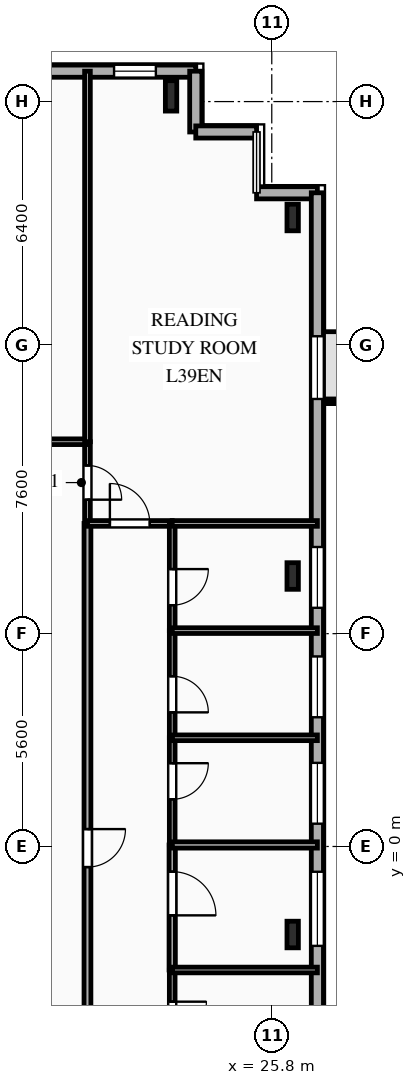
"""IFC4 building model, lengths in metres.
Left out: names, types, materials, properties, quantities, classifications, styles, units other than length and angle.
Written with IfcOpenShell. Run it as: python <this file> out.ifc"""

import sys

from ifc_helpers import new_model, si_unit, direction, frame, frame_2d, origin, origin_2d, place, context, subcontext, project, spatial, rectangle, i_section, extrude, element, fill, save


model = new_model("IFC4")
c1 = context("Model", 3, precision=1e-05, world=origin(), true_north=direction((0.0, 1.0)))
c2 = subcontext(c1, "Body", "Model", "MODEL_VIEW")
j1 = project(units=[si_unit("LENGTHUNIT", "METRE"), si_unit("PLANEANGLEUNIT", "RADIAN")], contexts=[c1])
p1 = place(None, origin())
s1 = spatial("IfcSite", under=j1, at=p1, CompositionType="ELEMENT")
p2 = place(p1, origin())
s2 = spatial("IfcBuilding", under=s1, at=p2, CompositionType="ELEMENT")
p3 = place(p2, frame((0.0, 0.0, 141.05)))
s3 = spatial("IfcBuildingStorey", under=s2, at=p3, CompositionType="ELEMENT", Elevation=141.05)
p4 = place(p3, frame((23.15, 19.75, 0.0), z_axis=(0.0, 0.0, 1.0), x_axis=(1.0, 0.0, 0.0)))
e1 = element("IfcColumn", 1, at=p4, inside=s3, PredefinedType="COLUMN", context=c2, shape_type="SweptSolid", body=[
    extrude(i_section(OverallWidth=0.3, OverallDepth=0.8, WebThickness=0.018, FlangeThickness=0.033, FilletRadius=0.03, at=origin_2d()), origin(), (0.0, 0.0, 1.0), 3.35),
])
for number, where, z_axis, x_axis in (
    (2, (26.35, -2.317, 0.0), (0.0, 0.0, 1.0), (1.0, 0.0, 0.0)),
    (3, (26.35, 7.117, 0.0), (0.0, 0.0, 1.0), (1.0, 0.0, 0.0)),
    (4, (26.35, 16.55, 0.0), (0.0, 0.0, 1.0), (1.0, 0.0, 0.0)),
):
    element("IfcColumn", number, at=place(p3, frame(where, z_axis=z_axis, x_axis=x_axis)), inside=s3, PredefinedType="COLUMN", context=c2, shape_type="SweptSolid", body=[
        extrude(i_section(OverallWidth=0.3, OverallDepth=0.7, WebThickness=0.017, FlangeThickness=0.032, FilletRadius=0.027, at=origin_2d()), origin(), (0.0, 0.0, 1.0), 3.35),
    ])
p5 = place(p3, frame((-25.8, 20.4, 0.0), z_axis=(0.0, 0.0, 1.0), x_axis=(1.0, 0.0, 0.0)))
e5 = element("IfcWall", 5, at=p5, inside=s3, PredefinedType="SOLIDWALL", context=c2, shape_type="SweptSolid", body=[
    extrude(rectangle(XDim=49.6, YDim=0.32, at=frame_2d((24.8, 0.0))), origin(), (0.0, 0.0, 1.0), 3.04),
])
p6 = place(p5, frame((2.135, 0.0, 0.85)))
e6 = element("IfcOpeningElement", 6, at=p6, cuts=e5, PredefinedType="OPENING", context=c2, shape_type="SweptSolid", body=[
    extrude(rectangle(XDim=1.65, YDim=1.85, at=frame_2d((0.825, 0.925))), frame((0.0, 0.17, 0.0), z_axis=(0.0, -1.0, 0.0), x_axis=(1.0, 0.0, 0.0)), (0.0, 0.0, 1.0), 0.34),
])
p7 = place(p5, frame((6.706, 0.0, 0.85)))
e7 = element("IfcOpeningElement", 7, at=p7, cuts=e5, PredefinedType="OPENING", context=c2, shape_type="SweptSolid", body=[
    extrude(rectangle(XDim=1.65, YDim=1.85, at=frame_2d((0.825, 0.925))), frame((0.0, 0.17, 0.0), z_axis=(0.0, -1.0, 0.0), x_axis=(1.0, 0.0, 0.0)), (0.0, 0.0, 1.0), 0.34),
])
p8 = place(p5, frame((14.76, 0.0, 0.85)))
e8 = element("IfcOpeningElement", 8, at=p8, cuts=e5, PredefinedType="OPENING", context=c2, shape_type="SweptSolid", body=[
    extrude(rectangle(XDim=1.6, YDim=1.85, at=frame_2d((0.8, 0.925))), frame((0.0, 0.17, 0.0), z_axis=(0.0, -1.0, 0.0), x_axis=(1.0, 0.0, 0.0)), (0.0, 0.0, 1.0), 0.34),
])
p9 = place(p5, frame((19.26, 0.0, 0.85)))
e9 = element("IfcOpeningElement", 9, at=p9, cuts=e5, PredefinedType="OPENING", context=c2, shape_type="SweptSolid", body=[
    extrude(rectangle(XDim=2.2, YDim=1.85, at=frame_2d((1.1, 0.925))), frame((0.0, 0.17, 0.0), z_axis=(0.0, -1.0, 0.0), x_axis=(1.0, 0.0, 0.0)), (0.0, 0.0, 1.0), 0.34),
])
p10 = place(p5, frame((25.26, 0.0, 0.85)))
e10 = element("IfcOpeningElement", 10, at=p10, cuts=e5, PredefinedType="OPENING", context=c2, shape_type="SweptSolid", body=[
    extrude(rectangle(XDim=2.2, YDim=1.85, at=frame_2d((1.1, 0.925))), frame((0.0, 0.17, 0.0), z_axis=(0.0, -1.0, 0.0), x_axis=(1.0, 0.0, 0.0)), (0.0, 0.0, 1.0), 0.34),
])
p11 = place(p5, frame((30.4, 0.0, 0.85)))
e11 = element("IfcOpeningElement", 11, at=p11, cuts=e5, PredefinedType="OPENING", context=c2, shape_type="SweptSolid", body=[
    extrude(rectangle(XDim=2.2, YDim=1.85, at=frame_2d((1.1, 0.925))), frame((0.0, 0.17, 0.0), z_axis=(0.0, -1.0, 0.0), x_axis=(1.0, 0.0, 0.0)), (0.0, 0.0, 1.0), 0.34),
])
p12 = place(p5, frame((37.18, 0.0, 0.85)))
e12 = element("IfcOpeningElement", 12, at=p12, cuts=e5, PredefinedType="OPENING", context=c2, shape_type="SweptSolid", body=[
    extrude(rectangle(XDim=2.2, YDim=1.85, at=frame_2d((1.1, 0.925))), frame((0.0, 0.17, 0.0), z_axis=(0.0, -1.0, 0.0), x_axis=(1.0, 0.0, 0.0)), (0.0, 0.0, 1.0), 0.34),
])
p13 = place(p5, frame((43.215, 0.0, 0.85)))
e13 = element("IfcOpeningElement", 13, at=p13, cuts=e5, PredefinedType="OPENING", context=c2, shape_type="SweptSolid", body=[
    extrude(rectangle(XDim=1.65, YDim=1.85, at=frame_2d((0.825, 0.925))), frame((0.0, 0.17, 0.0), z_axis=(0.0, -1.0, 0.0), x_axis=(1.0, 0.0, 0.0)), (0.0, 0.0, 1.0), 0.34),
])
p14 = place(p5, frame((47.45, 0.0, 0.85)))
e14 = element("IfcOpeningElement", 14, at=p14, cuts=e5, PredefinedType="OPENING", context=c2, shape_type="SweptSolid", body=[
    extrude(rectangle(XDim=1.1, YDim=1.85, at=frame_2d((0.55, 0.925))), frame((0.0, 0.17, 0.0), z_axis=(0.0, -1.0, 0.0), x_axis=(1.0, 0.0, 0.0)), (0.0, 0.0, 1.0), 0.34),
])
for number, where, z_axis, x_axis in (
    (15, (23.8, 20.4, 0.0), (0.0, 0.0, 1.0), (0.0, -1.0, 0.0)),
    (16, (23.8, 18.8, 0.0), (0.0, 0.0, 1.0), (1.0, 0.0, 0.0)),
):
    element("IfcWall", number, at=place(p3, frame(where, z_axis=z_axis, x_axis=x_axis)), inside=s3, PredefinedType="SOLIDWALL", context=c2, shape_type="SweptSolid", body=[
        extrude(rectangle(XDim=1.6, YDim=0.32, at=frame_2d((0.8, 0.0))), origin(), (0.0, 0.0, 1.0), 3.04),
    ])
p15 = place(p3, frame((25.4, 17.2, 0.0), z_axis=(0.0, 0.0, 1.0), x_axis=(1.0, 0.0, 0.0)))
e17 = element("IfcWall", 17, at=p15, inside=s3, PredefinedType="SOLIDWALL", context=c2, shape_type="SweptSolid", body=[
    extrude(rectangle(XDim=1.6, YDim=0.32, at=frame_2d((0.8, 0.0))), origin(), (0.0, 0.0, 1.0), 3.04),
])
p16 = place(p3, frame((27.0, 17.2, 0.0), z_axis=(0.0, 0.0, 1.0), x_axis=(0.0, -1.0, 0.0)))
e18 = element("IfcWall", 18, at=p16, inside=s3, PredefinedType="SOLIDWALL", context=c2, shape_type="SweptSolid", body=[
    extrude(rectangle(XDim=29.6, YDim=0.32, at=frame_2d((14.8, 0.0))), origin(), (0.0, 0.0, 1.0), 3.04),
])
p17 = place(p16, frame((3.775, 0.0, 0.85)))
e19 = element("IfcOpeningElement", 19, at=p17, cuts=e18, PredefinedType="OPENING", context=c2, shape_type="SweptSolid", body=[
    extrude(rectangle(XDim=1.65, YDim=1.85, at=frame_2d((0.825, 0.925))), frame((0.0, 0.17, 0.0), z_axis=(0.0, -1.0, 0.0), x_axis=(1.0, 0.0, 0.0)), (0.0, 0.0, 1.0), 0.34),
])
p18 = place(p16, frame((9.32, 0.0, 0.85)))
e20 = element("IfcOpeningElement", 20, at=p18, cuts=e18, PredefinedType="OPENING", context=c2, shape_type="SweptSolid", body=[
    extrude(rectangle(XDim=1.6, YDim=1.85, at=frame_2d((0.8, 0.925))), frame((0.0, 0.17, 0.0), z_axis=(0.0, -1.0, 0.0), x_axis=(1.0, 0.0, 0.0)), (0.0, 0.0, 1.0), 0.34),
])
p19 = place(p16, frame((12.2, 0.0, 0.85)))
e21 = element("IfcOpeningElement", 21, at=p19, cuts=e18, PredefinedType="OPENING", context=c2, shape_type="SweptSolid", body=[
    extrude(rectangle(XDim=1.6, YDim=1.85, at=frame_2d((0.8, 0.925))), frame((0.0, 0.17, 0.0), z_axis=(0.0, -1.0, 0.0), x_axis=(1.0, 0.0, 0.0)), (0.0, 0.0, 1.0), 0.34),
])
p20 = place(p16, frame((15.0, 0.0, 0.85)))
e22 = element("IfcOpeningElement", 22, at=p20, cuts=e18, PredefinedType="OPENING", context=c2, shape_type="SweptSolid", body=[
    extrude(rectangle(XDim=1.6, YDim=1.85, at=frame_2d((0.8, 0.925))), frame((0.0, 0.17, 0.0), z_axis=(0.0, -1.0, 0.0), x_axis=(1.0, 0.0, 0.0)), (0.0, 0.0, 1.0), 0.34),
])
p21 = place(p16, frame((17.865, 0.0, 0.85)))
e23 = element("IfcOpeningElement", 23, at=p21, cuts=e18, PredefinedType="OPENING", context=c2, shape_type="SweptSolid", body=[
    extrude(rectangle(XDim=1.95, YDim=1.85, at=frame_2d((0.975, 0.925))), frame((0.0, 0.17, 0.0), z_axis=(0.0, -1.0, 0.0), x_axis=(1.0, 0.0, 0.0)), (0.0, 0.0, 1.0), 0.34),
])
p22 = place(p16, frame((25.175, 0.0, 0.85)))
e24 = element("IfcOpeningElement", 24, at=p22, cuts=e18, PredefinedType="OPENING", context=c2, shape_type="SweptSolid", body=[
    extrude(rectangle(XDim=1.65, YDim=1.85, at=frame_2d((0.825, 0.925))), frame((0.0, 0.17, 0.0), z_axis=(0.0, -1.0, 0.0), x_axis=(1.0, 0.0, 0.0)), (0.0, 0.0, 1.0), 0.34),
])
p23 = place(p3, frame((20.95, 10.65, 0.0), z_axis=(0.0, 0.0, 1.0), x_axis=(0.0, -1.0, 0.0)))
e25 = element("IfcWall", 25, at=p23, inside=s3, PredefinedType="PARTITIONING", context=c2, shape_type="SweptSolid", body=[
    extrude(rectangle(XDim=2.15, YDim=0.15, at=frame_2d((1.075, 0.0))), origin(), (0.0, 0.0, 1.0), 3.04),
])
p24 = place(p23, frame((0.625, 0.0, 0.0)))
e26 = element("IfcOpeningElement", 26, at=p24, cuts=e25, PredefinedType="OPENING", context=c2, shape_type="SweptSolid", body=[
    extrude(rectangle(XDim=0.9, YDim=2.1, at=frame_2d((0.45, 1.05))), frame((0.0, 0.085, 0.0), z_axis=(0.0, -1.0, 0.0), x_axis=(1.0, 0.0, 0.0)), (0.0, 0.0, 1.0), 0.17),
])
p25 = place(p3, frame((15.464, 10.65, 0.0), z_axis=(0.0, 0.0, 1.0), x_axis=(1.0, 0.0, 0.0)))
e27 = element("IfcWall", 27, at=p25, inside=s3, PredefinedType="PARTITIONING", context=c2, shape_type="SweptSolid", body=[
    extrude(rectangle(XDim=5.486, YDim=0.15, at=frame_2d((2.743, 0.0))), origin(), (0.0, 0.0, 1.0), 3.04),
])
p26 = place(p25, frame((0.99, 0.0, 0.0)))
e28 = element("IfcOpeningElement", 28, at=p26, cuts=e27, PredefinedType="OPENING", context=c2, shape_type="SweptSolid", body=[
    extrude(rectangle(XDim=1.05, YDim=2.15, at=frame_2d((0.525, 1.075))), frame((0.0, 0.085, 0.0), z_axis=(0.0, -1.0, 0.0), x_axis=(1.0, 0.0, 0.0)), (0.0, 0.0, 1.0), 0.17),
])
p27 = place(p3, frame((20.95, 8.5, 0.0), z_axis=(0.0, 0.0, 1.0), x_axis=(0.0, -1.0, 0.0)))
e29 = element("IfcWall", 29, at=p27, inside=s3, PredefinedType="PARTITIONING", context=c2, shape_type="SweptSolid", body=[
    extrude(rectangle(XDim=14.1, YDim=0.18, at=frame_2d((7.05, 0.0))), origin(), (0.0, 0.0, 1.0), 3.04),
])
p28 = place(p27, frame((8.042, 0.0, 0.0)))
e30 = element("IfcOpeningElement", 30, at=p28, cuts=e29, PredefinedType="OPENING", context=c2, shape_type="SweptSolid", body=[
    extrude(rectangle(XDim=1.0, YDim=2.15, at=frame_2d((0.5, 1.075))), frame((0.0, 0.1, 0.0), z_axis=(0.0, -1.0, 0.0), x_axis=(1.0, 0.0, 0.0)), (0.0, 0.0, 1.0), 0.2),
])
p29 = place(p3, frame((20.95, 8.5, 0.0), z_axis=(0.0, 0.0, 1.0), x_axis=(1.0, 0.0, 0.0)))
e31 = element("IfcWall", 31, at=p29, inside=s3, PredefinedType="PARTITIONING", context=c2, shape_type="SweptSolid", body=[
    extrude(rectangle(XDim=2.23, YDim=0.15, at=frame_2d((1.115, 0.0))), origin(), (0.0, 0.0, 1.0), 3.04),
])
p30 = place(p29, frame((0.59, 0.0, 0.0)))
e32 = element("IfcOpeningElement", 32, at=p30, cuts=e31, PredefinedType="OPENING", context=c2, shape_type="SweptSolid", body=[
    extrude(rectangle(XDim=1.05, YDim=2.15, at=frame_2d((0.525, 1.075))), frame((0.0, 0.085, 0.0), z_axis=(0.0, -1.0, 0.0), x_axis=(1.0, 0.0, 0.0)), (0.0, 0.0, 1.0), 0.17),
])
p31 = place(p3, frame((23.18, -3.25, 0.0), z_axis=(0.0, 0.0, 1.0), x_axis=(0.0, -1.0, 0.0)))
e33 = element("IfcWall", 33, at=p31, inside=s3, PredefinedType="PLUMBINGWALL", context=c2, shape_type="SweptSolid", body=[
    extrude(rectangle(XDim=2.35, YDim=0.15, at=frame_2d((1.175, 0.0))), origin(), (0.0, 0.0, 1.0), 3.04),
])
p32 = place(p31, frame((0.834, 0.0, 0.0)))
e34 = element("IfcOpeningElement", 34, at=p32, cuts=e33, PredefinedType="OPENING", context=c2, shape_type="SweptSolid", body=[
    extrude(rectangle(XDim=0.9, YDim=2.1, at=frame_2d((0.45, 1.05))), frame((0.0, 0.085, 0.0), z_axis=(0.0, -1.0, 0.0), x_axis=(1.0, 0.0, 0.0)), (0.0, 0.0, 1.0), 0.17),
])
p33 = place(p3, frame((23.18, 0.04, 0.0), z_axis=(0.0, 0.0, 1.0), x_axis=(0.0, -1.0, 0.0)))
e35 = element("IfcWall", 35, at=p33, inside=s3, PredefinedType="PARTITIONING", context=c2, shape_type="SweptSolid", body=[
    extrude(rectangle(XDim=3.29, YDim=0.165, at=frame_2d((1.645, 0.0))), origin(), (0.0, 0.0, 1.0), 3.04),
])
p34 = place(p33, frame((0.702, 0.0, 0.0)))
e36 = element("IfcOpeningElement", 36, at=p34, cuts=e35, PredefinedType="OPENING", context=c2, shape_type="SweptSolid", body=[
    extrude(rectangle(XDim=1.15, YDim=2.15, at=frame_2d((0.575, 1.075))), frame((0.0, 0.093, 0.0), z_axis=(0.0, -1.0, 0.0), x_axis=(1.0, 0.0, 0.0)), (0.0, 0.0, 1.0), 0.185),
])
p35 = place(p3, frame((23.18, 2.86, 0.0), z_axis=(0.0, 0.0, 1.0), x_axis=(0.0, -1.0, 0.0)))
e37 = element("IfcWall", 37, at=p35, inside=s3, PredefinedType="PARTITIONING", context=c2, shape_type="SweptSolid", body=[
    extrude(rectangle(XDim=2.82, YDim=0.15, at=frame_2d((1.41, 0.0))), origin(), (0.0, 0.0, 1.0), 3.04),
])
p36 = place(p35, frame((0.669, 0.0, 0.0)))
e38 = element("IfcOpeningElement", 38, at=p36, cuts=e37, PredefinedType="OPENING", context=c2, shape_type="SweptSolid", body=[
    extrude(rectangle(XDim=0.95, YDim=2.1, at=frame_2d((0.475, 1.05))), frame((0.0, 0.085, 0.0), z_axis=(0.0, -1.0, 0.0), x_axis=(1.0, 0.0, 0.0)), (0.0, 0.0, 1.0), 0.17),
])
p37 = place(p3, frame((23.18, 5.68, 0.0), z_axis=(0.0, 0.0, 1.0), x_axis=(0.0, -1.0, 0.0)))
e39 = element("IfcWall", 39, at=p37, inside=s3, PredefinedType="PARTITIONING", context=c2, shape_type="SweptSolid", body=[
    extrude(rectangle(XDim=2.82, YDim=0.15, at=frame_2d((1.41, 0.0))), origin(), (0.0, 0.0, 1.0), 3.04),
])
p38 = place(p37, frame((1.201, 0.0, 0.0)))
e40 = element("IfcOpeningElement", 40, at=p38, cuts=e39, PredefinedType="OPENING", context=c2, shape_type="SweptSolid", body=[
    extrude(rectangle(XDim=0.95, YDim=2.1, at=frame_2d((0.475, 1.05))), frame((0.0, 0.085, 0.0), z_axis=(0.0, -1.0, 0.0), x_axis=(1.0, 0.0, 0.0)), (0.0, 0.0, 1.0), 0.17),
])
p39 = place(p3, frame((23.18, 8.5, 0.0), z_axis=(0.0, 0.0, 1.0), x_axis=(0.0, -1.0, 0.0)))
e41 = element("IfcWall", 41, at=p39, inside=s3, PredefinedType="PARTITIONING", context=c2, shape_type="SweptSolid", body=[
    extrude(rectangle(XDim=2.82, YDim=0.15, at=frame_2d((1.41, 0.0))), origin(), (0.0, 0.0, 1.0), 3.04),
])
p40 = place(p39, frame((1.201, 0.0, 0.0)))
e42 = element("IfcOpeningElement", 42, at=p40, cuts=e41, PredefinedType="OPENING", context=c2, shape_type="SweptSolid", body=[
    extrude(rectangle(XDim=0.95, YDim=2.1, at=frame_2d((0.475, 1.05))), frame((0.0, 0.085, 0.0), z_axis=(0.0, -1.0, 0.0), x_axis=(1.0, 0.0, 0.0)), (0.0, 0.0, 1.0), 0.17),
])
p41 = place(p3, frame((27.0, 8.5, 0.0), z_axis=(0.0, 0.0, 1.0), x_axis=(-1.0, 0.0, 0.0)))
e43 = element("IfcWall", 43, at=p41, inside=s3, PredefinedType="PARTITIONING", context=c2, shape_type="SweptSolid", body=[
    extrude(rectangle(XDim=3.82, YDim=0.15, at=frame_2d((1.91, 0.0))), origin(), (0.0, 0.0, 1.0), 3.04),
])
p42 = place(p3, frame((20.95, 10.65, 0.0), z_axis=(0.0, 0.0, 1.0), x_axis=(0.0, 1.0, 0.0)))
e44 = element("IfcWall", 44, at=p42, inside=s3, PredefinedType="PARTITIONING", context=c2, shape_type="SweptSolid", body=[
    extrude(rectangle(XDim=9.75, YDim=0.15, at=frame_2d((4.875, 0.0))), origin(), (0.0, 0.0, 1.0), 2.525),
])
p43 = place(p3, frame((23.18, -3.25, 0.0), z_axis=(0.0, 0.0, 1.0), x_axis=(1.0, 0.0, 0.0)))
e45 = element("IfcWall", 45, at=p43, inside=s3, PredefinedType="PLUMBINGWALL", context=c2, shape_type="SweptSolid", body=[
    extrude(rectangle(XDim=3.82, YDim=0.15, at=frame_2d((1.91, 0.0))), origin(), (0.0, 0.0, 1.0), 3.04),
])
p44 = place(p3, frame((23.18, 0.04, 0.0), z_axis=(0.0, 0.0, 1.0), x_axis=(1.0, 0.0, 0.0)))
e46 = element("IfcWall", 46, at=p44, inside=s3, PredefinedType="PARTITIONING", context=c2, shape_type="SweptSolid", body=[
    extrude(rectangle(XDim=3.82, YDim=0.165, at=frame_2d((1.91, 0.0))), origin(), (0.0, 0.0, 1.0), 3.04),
])
for number, where, z_axis, x_axis in (
    (47, (23.18, 2.86, 0.0), (0.0, 0.0, 1.0), (1.0, 0.0, 0.0)),
    (48, (23.18, 5.68, 0.0), (0.0, 0.0, 1.0), (1.0, 0.0, 0.0)),
):
    element("IfcWall", number, at=place(p3, frame(where, z_axis=z_axis, x_axis=x_axis)), inside=s3, PredefinedType="PARTITIONING", context=c2, shape_type="SweptSolid", body=[
        extrude(rectangle(XDim=3.82, YDim=0.15, at=frame_2d((1.91, 0.0))), origin(), (0.0, 0.0, 1.0), 3.04),
    ])
p45 = place(p14, origin())
e49 = element("IfcWindow", 49, at=p45, inside=s3, PartitioningType="SINGLE_PANEL", PredefinedType="WINDOW", context=c2, shape_type="SweptSolid", body=[
    extrude(rectangle(XDim=1.1, YDim=1.85, at=frame_2d((0.55, 0.925))), frame((0.0, 0.03, 0.0), z_axis=(0.0, -1.0, 0.0), x_axis=(1.0, 0.0, 0.0)), (0.0, 0.0, 1.0), 0.06),
])
fill(e14, e49)
p46 = place(p17, origin())
e50 = element("IfcWindow", 50, at=p46, inside=s3, PartitioningType="SINGLE_PANEL", PredefinedType="WINDOW", context=c2, shape_type="SweptSolid", body=[
    extrude(rectangle(XDim=1.65, YDim=1.85, at=frame_2d((0.825, 0.925))), frame((0.0, 0.03, 0.0), z_axis=(0.0, -1.0, 0.0), x_axis=(1.0, 0.0, 0.0)), (0.0, 0.0, 1.0), 0.06),
])
fill(e19, e50)
p47 = place(p18, origin())
e51 = element("IfcWindow", 51, at=p47, inside=s3, PartitioningType="SINGLE_PANEL", PredefinedType="WINDOW", context=c2, shape_type="SweptSolid", body=[
    extrude(rectangle(XDim=1.6, YDim=1.85, at=frame_2d((0.8, 0.925))), frame((0.0, 0.03, 0.0), z_axis=(0.0, -1.0, 0.0), x_axis=(1.0, 0.0, 0.0)), (0.0, 0.0, 1.0), 0.06),
])
fill(e20, e51)
p48 = place(p19, origin())
e52 = element("IfcWindow", 52, at=p48, inside=s3, PartitioningType="SINGLE_PANEL", PredefinedType="WINDOW", context=c2, shape_type="SweptSolid", body=[
    extrude(rectangle(XDim=1.6, YDim=1.85, at=frame_2d((0.8, 0.925))), frame((0.0, 0.03, 0.0), z_axis=(0.0, -1.0, 0.0), x_axis=(1.0, 0.0, 0.0)), (0.0, 0.0, 1.0), 0.06),
])
fill(e21, e52)
p49 = place(p20, origin())
e53 = element("IfcWindow", 53, at=p49, inside=s3, PartitioningType="SINGLE_PANEL", PredefinedType="WINDOW", context=c2, shape_type="SweptSolid", body=[
    extrude(rectangle(XDim=1.6, YDim=1.85, at=frame_2d((0.8, 0.925))), frame((0.0, 0.03, 0.0), z_axis=(0.0, -1.0, 0.0), x_axis=(1.0, 0.0, 0.0)), (0.0, 0.0, 1.0), 0.06),
])
fill(e22, e53)
p50 = place(p21, origin())
e54 = element("IfcWindow", 54, at=p50, inside=s3, PartitioningType="SINGLE_PANEL", PredefinedType="WINDOW", context=c2, shape_type="SweptSolid", body=[
    extrude(rectangle(XDim=1.95, YDim=1.85, at=frame_2d((0.975, 0.925))), frame((0.0, 0.03, 0.0), z_axis=(0.0, -1.0, 0.0), x_axis=(1.0, 0.0, 0.0)), (0.0, 0.0, 1.0), 0.06),
])
fill(e23, e54)
p51 = place(p24, origin())
e55 = element("IfcDoor", 55, at=p51, inside=s3, OperationType="SINGLE_SWING_RIGHT", PredefinedType="DOOR", context=c2, shape_type="SweptSolid", body=[
    extrude(rectangle(XDim=0.9, YDim=2.1, at=frame_2d((0.45, 1.05))), frame((0.0, 0.025, 0.0), z_axis=(0.0, -1.0, 0.0), x_axis=(1.0, 0.0, 0.0)), (0.0, 0.0, 1.0), 0.05),
])
fill(e26, e55)
p52 = place(p28, origin())
e56 = element("IfcDoor", 56, at=p52, inside=s3, OperationType="SINGLE_SWING_LEFT", PredefinedType="DOOR", context=c2, shape_type="SweptSolid", body=[
    extrude(rectangle(XDim=1.0, YDim=2.15, at=frame_2d((0.5, 1.075))), frame((0.0, 0.025, 0.0), z_axis=(0.0, -1.0, 0.0), x_axis=(1.0, 0.0, 0.0)), (0.0, 0.0, 1.0), 0.05),
])
fill(e30, e56)
p53 = place(p30, origin())
e57 = element("IfcDoor", 57, at=p53, inside=s3, OperationType="SINGLE_SWING_LEFT", PredefinedType="DOOR", context=c2, shape_type="SweptSolid", body=[
    extrude(rectangle(XDim=1.05, YDim=2.15, at=frame_2d((0.525, 1.075))), frame((0.0, 0.025, 0.0), z_axis=(0.0, -1.0, 0.0), x_axis=(1.0, 0.0, 0.0)), (0.0, 0.0, 1.0), 0.05),
])
fill(e32, e57)
p54 = place(p32, origin())
e58 = element("IfcDoor", 58, at=p54, inside=s3, OperationType="SINGLE_SWING_LEFT", PredefinedType="DOOR", context=c2, shape_type="SweptSolid", body=[
    extrude(rectangle(XDim=0.9, YDim=2.1, at=frame_2d((0.45, 1.05))), frame((0.0, 0.025, 0.0), z_axis=(0.0, -1.0, 0.0), x_axis=(1.0, 0.0, 0.0)), (0.0, 0.0, 1.0), 0.05),
])
fill(e34, e58)
p55 = place(p34, origin())
e59 = element("IfcDoor", 59, at=p55, inside=s3, OperationType="SINGLE_SWING_RIGHT", PredefinedType="DOOR", context=c2, shape_type="SweptSolid", body=[
    extrude(rectangle(XDim=1.15, YDim=2.15, at=frame_2d((0.575, 1.075))), frame((0.0, 0.025, 0.0), z_axis=(0.0, -1.0, 0.0), x_axis=(1.0, 0.0, 0.0)), (0.0, 0.0, 1.0), 0.05),
])
fill(e36, e59)
p56 = place(p36, origin())
e60 = element("IfcDoor", 60, at=p56, inside=s3, OperationType="SINGLE_SWING_LEFT", PredefinedType="DOOR", context=c2, shape_type="SweptSolid", body=[
    extrude(rectangle(XDim=0.95, YDim=2.1, at=frame_2d((0.475, 1.05))), frame((0.0, 0.025, 0.0), z_axis=(0.0, -1.0, 0.0), x_axis=(1.0, 0.0, 0.0)), (0.0, 0.0, 1.0), 0.05),
])
fill(e38, e60)
p57 = place(p38, origin())
e61 = element("IfcDoor", 61, at=p57, inside=s3, OperationType="SINGLE_SWING_RIGHT", PredefinedType="DOOR", context=c2, shape_type="SweptSolid", body=[
    extrude(rectangle(XDim=0.95, YDim=2.1, at=frame_2d((0.475, 1.05))), frame((0.0, 0.025, 0.0), z_axis=(0.0, -1.0, 0.0), x_axis=(1.0, 0.0, 0.0)), (0.0, 0.0, 1.0), 0.05),
])
fill(e40, e61)
p58 = place(p40, origin())
e62 = element("IfcDoor", 62, at=p58, inside=s3, OperationType="SINGLE_SWING_LEFT", PredefinedType="DOOR", context=c2, shape_type="SweptSolid", body=[
    extrude(rectangle(XDim=0.95, YDim=2.1, at=frame_2d((0.475, 1.05))), frame((0.0, 0.025, 0.0), z_axis=(0.0, -1.0, 0.0), x_axis=(1.0, 0.0, 0.0)), (0.0, 0.0, 1.0), 0.05),
])
fill(e42, e62)
save(model, sys.argv[1])
